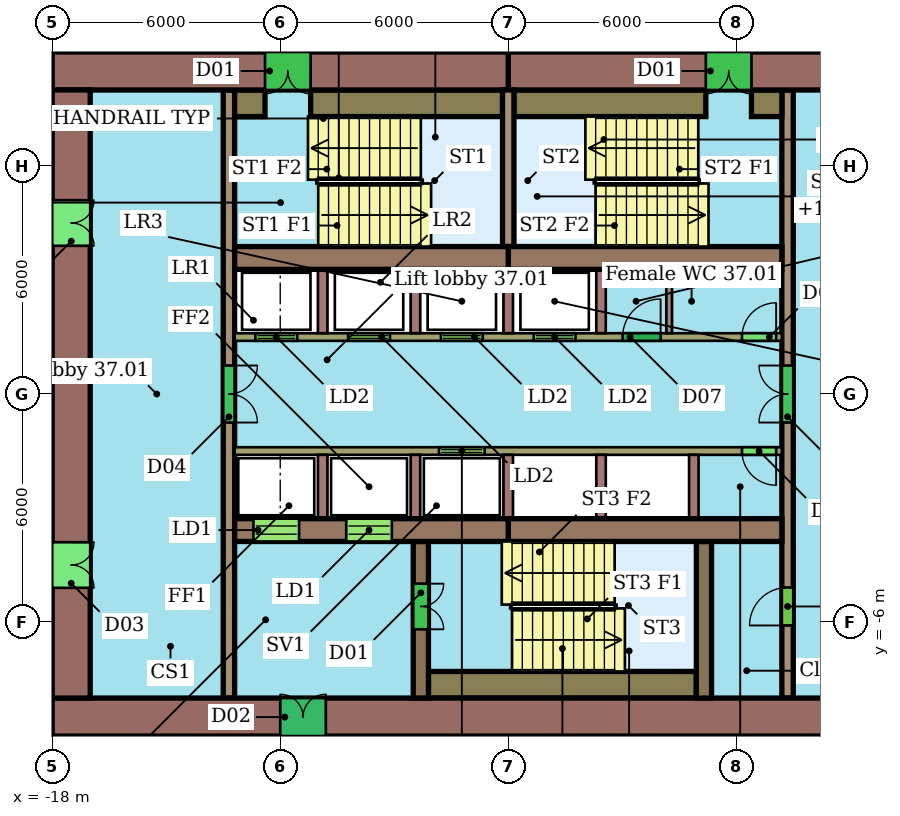
"""IFC4 building model, lengths in metres.
Left out: names, types, materials, properties, quantities, classifications, styles, units other than length and angle.
Written with IfcOpenShell. Run it as: python <this file> out.ifc"""

import sys

from ifc_helpers import new_model, si_unit, direction, frame, frame_2d, origin, place, context, subcontext, project, spatial, rectangle, extrude, element, fill, save


model = new_model("IFC4")
c1 = context("Model", 3, precision=1e-05, world=origin(), true_north=direction((0.0, 1.0)))
c2 = subcontext(c1, "Body", "Model", "MODEL_VIEW")
j1 = project(units=[si_unit("LENGTHUNIT", "METRE"), si_unit("PLANEANGLEUNIT", "RADIAN")], contexts=[c1])
p1 = place(None, origin())
s1 = spatial("IfcSite", under=j1, at=p1, CompositionType="ELEMENT")
p2 = place(p1, origin())
s2 = spatial("IfcBuilding", under=s1, at=p2, CompositionType="ELEMENT")
p3 = place(p2, frame((0.0, 0.0, 157.8)))
s3 = spatial("IfcBuildingStorey", under=s2, at=p3, CompositionType="ELEMENT", Elevation=157.8)
p4 = place(p3, frame((6.0, 8.5, 0.0), z_axis=(0.0, 0.0, 1.0), x_axis=(-1.0, 0.0, 0.0)))
e1 = element("IfcWall", 1, at=p4, inside=s3, PredefinedType="SHEAR", context=c2, shape_type="SweptSolid", body=[
    extrude(rectangle(XDim=12.0, YDim=1.0, at=frame_2d((6.0, 0.0))), origin(), (0.0, 0.0, 1.0), 3.3),
])
p5 = place(p4, frame((5.6, 0.0, 0.0)))
e2 = element("IfcOpeningElement", 2, at=p5, cuts=e1, PredefinedType="OPENING", context=c2, shape_type="SweptSolid", body=[
    extrude(rectangle(XDim=1.2, YDim=2.1, at=frame_2d((0.6, 1.05))), frame((0.0, 0.51, 0.0), z_axis=(0.0, -1.0, 0.0), x_axis=(1.0, 0.0, 0.0)), (0.0, 0.0, 1.0), 1.02),
])
p6 = place(p3, frame((-6.0, 8.5, 0.0), z_axis=(0.0, 0.0, 1.0), x_axis=(-1.0, 0.0, 0.0)))
e3 = element("IfcWall", 3, at=p6, inside=s3, PredefinedType="SHEAR", context=c2, shape_type="SweptSolid", body=[
    extrude(rectangle(XDim=12.0, YDim=1.0, at=frame_2d((6.0, 0.0))), origin(), (0.0, 0.0, 1.0), 3.3),
])
p7 = place(p6, frame((5.2, 0.0, 0.0)))
e4 = element("IfcOpeningElement", 4, at=p7, cuts=e3, PredefinedType="OPENING", context=c2, shape_type="SweptSolid", body=[
    extrude(rectangle(XDim=1.2, YDim=2.1, at=frame_2d((0.6, 1.05))), frame((0.0, 0.51, 0.0), z_axis=(0.0, -1.0, 0.0), x_axis=(1.0, 0.0, 0.0)), (0.0, 0.0, 1.0), 1.02),
])
p8 = place(p3, frame((-18.0, -8.5, 0.0), z_axis=(0.0, 0.0, 1.0), x_axis=(1.0, 0.0, 0.0)))
e5 = element("IfcWall", 5, at=p8, inside=s3, PredefinedType="SHEAR", context=c2, shape_type="SweptSolid", body=[
    extrude(rectangle(XDim=24.0, YDim=1.0, at=frame_2d((12.0, 0.0))), origin(), (0.0, 0.0, 1.0), 3.3),
])
p9 = place(p8, frame((6.0, 0.0, 0.0)))
e6 = element("IfcOpeningElement", 6, at=p9, cuts=e5, PredefinedType="OPENING", context=c2, shape_type="SweptSolid", body=[
    extrude(rectangle(XDim=1.2, YDim=2.1, at=frame_2d((0.6, 1.05))), frame((0.0, 0.51, 0.0), z_axis=(0.0, -1.0, 0.0), x_axis=(1.0, 0.0, 0.0)), (0.0, 0.0, 1.0), 1.02),
])
p10 = place(p3, frame((-17.5, 8.0, 0.0), z_axis=(0.0, 0.0, 1.0), x_axis=(0.0, -1.0, 0.0)))
e7 = element("IfcWall", 7, at=p10, inside=s3, PredefinedType="SHEAR", context=c2, shape_type="SweptSolid", body=[
    extrude(rectangle(XDim=16.0, YDim=1.0, at=frame_2d((8.0, 0.0))), origin(), (0.0, 0.0, 1.0), 3.3),
])
p11 = place(p10, frame((11.9, 0.0, 0.0)))
e8 = element("IfcOpeningElement", 8, at=p11, cuts=e7, PredefinedType="OPENING", context=c2, shape_type="SweptSolid", body=[
    extrude(rectangle(XDim=1.2, YDim=2.1, at=frame_2d((0.6, 1.05))), frame((0.0, 0.51, 0.0), z_axis=(0.0, -1.0, 0.0), x_axis=(1.0, 0.0, 0.0)), (0.0, 0.0, 1.0), 1.02),
])
p12 = place(p10, frame((2.9, 0.0, 0.0)))
e9 = element("IfcOpeningElement", 9, at=p12, cuts=e7, PredefinedType="OPENING", context=c2, shape_type="SweptSolid", body=[
    extrude(rectangle(XDim=1.2, YDim=2.1, at=frame_2d((0.6, 1.05))), frame((0.0, 0.51, 0.0), z_axis=(0.0, -1.0, 0.0), x_axis=(1.0, 0.0, 0.0)), (0.0, 0.0, 1.0), 1.02),
])
for number, where, z_axis, x_axis in (
    (10, (-13.2, 3.58, 0.0), (0.0, 0.0, 1.0), (1.0, 0.0, 0.0)),
    (11, (-6.0, 3.58, 0.0), (0.0, 0.0, 1.0), (1.0, 0.0, 0.0)),
):
    element("IfcWall", number, at=place(p3, frame(where, z_axis=z_axis, x_axis=x_axis)), inside=s3, PredefinedType="SHEAR", context=c2, shape_type="SweptSolid", body=[
        extrude(rectangle(XDim=7.2, YDim=0.6, at=frame_2d((3.6, 0.0))), origin(), (0.0, 0.0, 1.0), 3.3),
    ])
p13 = place(p3, frame((-13.2, -3.58, 0.0), z_axis=(0.0, 0.0, 1.0), x_axis=(1.0, 0.0, 0.0)))
e12 = element("IfcWall", 12, at=p13, inside=s3, PredefinedType="SHEAR", context=c2, shape_type="SweptSolid", body=[
    extrude(rectangle(XDim=7.2, YDim=0.6, at=frame_2d((3.6, 0.0))), origin(), (0.0, 0.0, 1.0), 3.3),
])
p14 = place(p13, frame((0.496, 0.0, 0.0)))
e13 = element("IfcOpeningElement", 13, at=p14, cuts=e12, PredefinedType="OPENING", context=c2, shape_type="SweptSolid", body=[
    extrude(rectangle(XDim=1.2, YDim=2.1, at=frame_2d((0.6, 1.05))), frame((0.0, 0.31, 0.0), z_axis=(0.0, -1.0, 0.0), x_axis=(1.0, 0.0, 0.0)), (0.0, 0.0, 1.0), 0.62),
])
p15 = place(p13, frame((2.938, 0.0, 0.0)))
e14 = element("IfcOpeningElement", 14, at=p15, cuts=e12, PredefinedType="OPENING", context=c2, shape_type="SweptSolid", body=[
    extrude(rectangle(XDim=1.2, YDim=2.1, at=frame_2d((0.6, 1.05))), frame((0.0, 0.31, 0.0), z_axis=(0.0, -1.0, 0.0), x_axis=(1.0, 0.0, 0.0)), (0.0, 0.0, 1.0), 0.62),
])
p16 = place(p3, frame((-6.0, -3.58, 0.0), z_axis=(0.0, 0.0, 1.0), x_axis=(1.0, 0.0, 0.0)))
e15 = element("IfcWall", 15, at=p16, inside=s3, PredefinedType="SHEAR", context=c2, shape_type="SweptSolid", body=[
    extrude(rectangle(XDim=7.2, YDim=0.6, at=frame_2d((3.6, 0.0))), origin(), (0.0, 0.0, 1.0), 3.3),
])
p17 = place(p3, frame((-13.35, 8.0, 0.0), z_axis=(0.0, 0.0, 1.0), x_axis=(0.0, -1.0, 0.0)))
e16 = element("IfcWall", 16, at=p17, inside=s3, PredefinedType="SHEAR", context=c2, shape_type="SweptSolid", body=[
    extrude(rectangle(XDim=16.0, YDim=0.3, at=frame_2d((8.0, 0.0))), origin(), (0.0, 0.0, 1.0), 3.3),
])
p18 = place(p17, frame((7.25, 0.0, 0.0)))
e17 = element("IfcOpeningElement", 17, at=p18, cuts=e16, PredefinedType="OPENING", context=c2, shape_type="SweptSolid", body=[
    extrude(rectangle(XDim=1.5, YDim=2.1, at=frame_2d((0.75, 1.05))), frame((0.0, 0.16, 0.0), z_axis=(0.0, -1.0, 0.0), x_axis=(1.0, 0.0, 0.0)), (0.0, 0.0, 1.0), 0.32),
])
p19 = place(p3, frame((1.35, -8.0, 0.0), z_axis=(0.0, 0.0, 1.0), x_axis=(0.0, 1.0, 0.0)))
e18 = element("IfcWall", 18, at=p19, inside=s3, PredefinedType="SHEAR", context=c2, shape_type="SweptSolid", body=[
    extrude(rectangle(XDim=16.0, YDim=0.3, at=frame_2d((8.0, 0.0))), origin(), (0.0, 0.0, 1.0), 3.3),
])
p20 = place(p19, frame((1.91, 0.0, 0.0)))
e19 = element("IfcOpeningElement", 19, at=p20, cuts=e18, PredefinedType="OPENING", context=c2, shape_type="SweptSolid", body=[
    extrude(rectangle(XDim=1.0, YDim=2.1, at=frame_2d((0.5, 1.05))), frame((0.0, 0.16, 0.0), z_axis=(0.0, -1.0, 0.0), x_axis=(1.0, 0.0, 0.0)), (0.0, 0.0, 1.0), 0.32),
])
p21 = place(p19, frame((7.25, 0.0, 0.0)))
e20 = element("IfcOpeningElement", 20, at=p21, cuts=e18, PredefinedType="OPENING", context=c2, shape_type="SweptSolid", body=[
    extrude(rectangle(XDim=1.5, YDim=2.1, at=frame_2d((0.75, 1.05))), frame((0.0, 0.16, 0.0), z_axis=(0.0, -1.0, 0.0), x_axis=(1.0, 0.0, 0.0)), (0.0, 0.0, 1.0), 0.32),
])
p22 = place(p3, frame((-13.2, 1.5, 0.0), z_axis=(0.0, 0.0, 1.0), x_axis=(1.0, 0.0, 0.0)))
e21 = element("IfcWall", 21, at=p22, inside=s3, PredefinedType="SHEAR", context=c2, shape_type="SweptSolid", body=[
    extrude(rectangle(XDim=14.4, YDim=0.2, at=frame_2d((7.2, 0.0))), origin(), (0.0, 0.0, 1.0), 3.3),
])
p23 = place(p22, frame((0.546, 0.0, 0.0)))
e22 = element("IfcOpeningElement", 22, at=p23, cuts=e21, PredefinedType="OPENING", context=c2, shape_type="SweptSolid", body=[
    extrude(rectangle(XDim=1.1, YDim=2.1, at=frame_2d((0.55, 1.05))), frame((0.0, 0.11, 0.0), z_axis=(0.0, -1.0, 0.0), x_axis=(1.0, 0.0, 0.0)), (0.0, 0.0, 1.0), 0.22),
])
p24 = place(p22, frame((2.988, 0.0, 0.0)))
e23 = element("IfcOpeningElement", 23, at=p24, cuts=e21, PredefinedType="OPENING", context=c2, shape_type="SweptSolid", body=[
    extrude(rectangle(XDim=1.1, YDim=2.1, at=frame_2d((0.55, 1.05))), frame((0.0, 0.11, 0.0), z_axis=(0.0, -1.0, 0.0), x_axis=(1.0, 0.0, 0.0)), (0.0, 0.0, 1.0), 0.22),
])
p25 = place(p22, frame((5.429, 0.0, 0.0)))
e24 = element("IfcOpeningElement", 24, at=p25, cuts=e21, PredefinedType="OPENING", context=c2, shape_type="SweptSolid", body=[
    extrude(rectangle(XDim=1.1, YDim=2.1, at=frame_2d((0.55, 1.05))), frame((0.0, 0.11, 0.0), z_axis=(0.0, -1.0, 0.0), x_axis=(1.0, 0.0, 0.0)), (0.0, 0.0, 1.0), 0.22),
])
p26 = place(p22, frame((7.871, 0.0, 0.0)))
e25 = element("IfcOpeningElement", 25, at=p26, cuts=e21, PredefinedType="OPENING", context=c2, shape_type="SweptSolid", body=[
    extrude(rectangle(XDim=1.1, YDim=2.1, at=frame_2d((0.55, 1.05))), frame((0.0, 0.11, 0.0), z_axis=(0.0, -1.0, 0.0), x_axis=(1.0, 0.0, 0.0)), (0.0, 0.0, 1.0), 0.22),
])
p27 = place(p22, frame((10.21, 0.0, 0.0)))
e26 = element("IfcOpeningElement", 26, at=p27, cuts=e21, PredefinedType="OPENING", context=c2, shape_type="SweptSolid", body=[
    extrude(rectangle(XDim=1.0, YDim=2.1, at=frame_2d((0.5, 1.05))), frame((0.0, 0.11, 0.0), z_axis=(0.0, -1.0, 0.0), x_axis=(1.0, 0.0, 0.0)), (0.0, 0.0, 1.0), 0.22),
])
p28 = place(p22, frame((13.35, 0.0, 0.0)))
e27 = element("IfcOpeningElement", 27, at=p28, cuts=e21, PredefinedType="OPENING", context=c2, shape_type="SweptSolid", body=[
    extrude(rectangle(XDim=0.9, YDim=2.1, at=frame_2d((0.45, 1.05))), frame((0.0, 0.11, 0.0), z_axis=(0.0, -1.0, 0.0), x_axis=(1.0, 0.0, 0.0)), (0.0, 0.0, 1.0), 0.22),
])
p29 = place(p3, frame((1.2, -1.5, 0.0), z_axis=(0.0, 0.0, 1.0), x_axis=(-1.0, 0.0, 0.0)))
e28 = element("IfcWall", 28, at=p29, inside=s3, PredefinedType="SHEAR", context=c2, shape_type="SweptSolid", body=[
    extrude(rectangle(XDim=14.4, YDim=0.2, at=frame_2d((7.2, 0.0))), origin(), (0.0, 0.0, 1.0), 3.3),
])
p30 = place(p29, frame((7.821, 0.0, 0.0)))
e29 = element("IfcOpeningElement", 29, at=p30, cuts=e28, PredefinedType="OPENING", context=c2, shape_type="SweptSolid", body=[
    extrude(rectangle(XDim=1.2, YDim=2.1, at=frame_2d((0.6, 1.05))), frame((0.0, 0.11, 0.0), z_axis=(0.0, -1.0, 0.0), x_axis=(1.0, 0.0, 0.0)), (0.0, 0.0, 1.0), 0.22),
])
p31 = place(p29, frame((0.15, 0.0, 0.0)))
e30 = element("IfcOpeningElement", 30, at=p31, cuts=e28, PredefinedType="OPENING", context=c2, shape_type="SweptSolid", body=[
    extrude(rectangle(XDim=0.9, YDim=2.1, at=frame_2d((0.45, 1.05))), frame((0.0, 0.11, 0.0), z_axis=(0.0, -1.0, 0.0), x_axis=(1.0, 0.0, 0.0)), (0.0, 0.0, 1.0), 0.22),
])
p32 = place(p3, frame((-8.3, -3.88, 0.0), z_axis=(0.0, 0.0, 1.0), x_axis=(0.0, -1.0, 0.0)))
e31 = element("IfcWall", 31, at=p32, inside=s3, PredefinedType="SHEAR", context=c2, shape_type="SweptSolid", body=[
    extrude(rectangle(XDim=4.12, YDim=0.4, at=frame_2d((2.06, 0.0))), origin(), (0.0, 0.0, 1.0), 3.3),
])
p33 = place(p32, frame((1.11, 0.0, 0.0)))
e32 = element("IfcOpeningElement", 32, at=p33, cuts=e31, PredefinedType="OPENING", context=c2, shape_type="SweptSolid", body=[
    extrude(rectangle(XDim=1.2, YDim=2.1, at=frame_2d((0.6, 1.05))), frame((0.0, 0.21, 0.0), z_axis=(0.0, -1.0, 0.0), x_axis=(1.0, 0.0, 0.0)), (0.0, 0.0, 1.0), 0.42),
])
p34 = place(p3, frame((-0.85, -3.88, 0.0), z_axis=(0.0, 0.0, 1.0), x_axis=(0.0, -1.0, 0.0)))
e33 = element("IfcWall", 33, at=p34, inside=s3, PredefinedType="SHEAR", context=c2, shape_type="SweptSolid", body=[
    extrude(rectangle(XDim=4.12, YDim=0.4, at=frame_2d((2.06, 0.0))), origin(), (0.0, 0.0, 1.0), 3.3),
])
p35 = place(p3, frame((-6.0, 3.88, 0.0), z_axis=(0.0, 0.0, 1.0), x_axis=(0.0, 1.0, 0.0)))
e34 = element("IfcWall", 34, at=p35, inside=s3, PredefinedType="SHEAR", context=c2, shape_type="SweptSolid", body=[
    extrude(rectangle(XDim=4.12, YDim=0.3, at=frame_2d((2.06, 0.0))), origin(), (0.0, 0.0, 1.0), 3.3),
])
p36 = place(p3, frame((-13.2, 7.65, 0.0), z_axis=(0.0, 0.0, 1.0), x_axis=(1.0, 0.0, 0.0)))
e35 = element("IfcWall", 35, at=p36, inside=s3, PredefinedType="SHEAR", context=c2, shape_type="SweptSolid", body=[
    extrude(rectangle(XDim=0.8, YDim=0.7, at=frame_2d((0.4, 0.0))), origin(), (0.0, 0.0, 1.0), 3.3),
])
for number, where, z_axis, x_axis in (
    (36, (-11.2, 7.65, 0.0), (0.0, 0.0, 1.0), (1.0, 0.0, 0.0)),
    (37, (-5.85, 7.65, 0.0), (0.0, 0.0, 1.0), (1.0, 0.0, 0.0)),
):
    element("IfcWall", number, at=place(p3, frame(where, z_axis=z_axis, x_axis=x_axis)), inside=s3, PredefinedType="SHEAR", context=c2, shape_type="SweptSolid", body=[
        extrude(rectangle(XDim=5.05, YDim=0.7, at=frame_2d((2.525, 0.0))), origin(), (0.0, 0.0, 1.0), 3.3),
    ])
p37 = place(p3, frame((0.4, 7.65, 0.0), z_axis=(0.0, 0.0, 1.0), x_axis=(1.0, 0.0, 0.0)))
e38 = element("IfcWall", 38, at=p37, inside=s3, PredefinedType="SHEAR", context=c2, shape_type="SweptSolid", body=[
    extrude(rectangle(XDim=0.8, YDim=0.7, at=frame_2d((0.4, 0.0))), origin(), (0.0, 0.0, 1.0), 3.3),
])
p38 = place(p3, frame((-8.1, -7.65, 0.0), z_axis=(0.0, 0.0, 1.0), x_axis=(1.0, 0.0, 0.0)))
e39 = element("IfcWall", 39, at=p38, inside=s3, PredefinedType="SHEAR", context=c2, shape_type="SweptSolid", body=[
    extrude(rectangle(XDim=7.05, YDim=0.7, at=frame_2d((3.525, 0.0))), origin(), (0.0, 0.0, 1.0), 3.3),
])
for number, where, z_axis, x_axis in (
    (40, (-10.883, 1.6, 0.0), (0.0, 0.0, 1.0), (0.0, 1.0, 0.0)),
    (41, (-8.442, 1.6, 0.0), (0.0, 0.0, 1.0), (0.0, 1.0, 0.0)),
    (42, (-6.0, 1.6, 0.0), (0.0, 0.0, 1.0), (0.0, 1.0, 0.0)),
    (43, (-3.558, 1.6, 0.0), (0.0, 0.0, 1.0), (0.0, 1.0, 0.0)),
):
    element("IfcWall", number, at=place(p3, frame(where, z_axis=z_axis, x_axis=x_axis)), inside=s3, PredefinedType="SHEAR", context=c2, shape_type="SweptSolid", body=[
        extrude(rectangle(XDim=1.68, YDim=0.25, at=frame_2d((0.84, 0.0))), origin(), (0.0, 0.0, 1.0), 3.3),
    ])
p39 = place(p3, frame((-1.765, 1.6, 0.0), z_axis=(0.0, 0.0, 1.0), x_axis=(0.0, 1.0, 0.0)))
e44 = element("IfcWall", 44, at=p39, inside=s3, PredefinedType="PARTITIONING", context=c2, shape_type="SweptSolid", body=[
    extrude(rectangle(XDim=1.68, YDim=0.15, at=frame_2d((0.84, 0.0))), origin(), (0.0, 0.0, 1.0), 3.3),
])
for number, where, z_axis, x_axis in (
    (45, (-10.883, -1.6, 0.0), (0.0, 0.0, 1.0), (0.0, -1.0, 0.0)),
    (46, (-8.442, -1.6, 0.0), (0.0, 0.0, 1.0), (0.0, -1.0, 0.0)),
    (47, (-6.0, -1.6, 0.0), (0.0, 0.0, 1.0), (0.0, -1.0, 0.0)),
    (48, (-3.558, -1.6, 0.0), (0.0, 0.0, 1.0), (0.0, -1.0, 0.0)),
    (49, (-1.117, -1.6, 0.0), (0.0, 0.0, 1.0), (0.0, -1.0, 0.0)),
):
    element("IfcWall", number, at=place(p3, frame(where, z_axis=z_axis, x_axis=x_axis)), inside=s3, PredefinedType="SHEAR", context=c2, shape_type="SweptSolid", body=[
        extrude(rectangle(XDim=1.68, YDim=0.25, at=frame_2d((0.84, 0.0))), origin(), (0.0, 0.0, 1.0), 3.3),
    ])
p40 = place(p5, origin())
e50 = element("IfcDoor", 50, at=p40, inside=s3, OperationType="DOUBLE_DOOR_SINGLE_SWING", PredefinedType="NOTDEFINED", context=c2, shape_type="SweptSolid", body=[
    extrude(rectangle(XDim=1.2, YDim=2.1, at=frame_2d((0.6, 1.05))), frame((0.0, 0.025, 0.0), z_axis=(0.0, -1.0, 0.0), x_axis=(1.0, 0.0, 0.0)), (0.0, 0.0, 1.0), 0.05),
])
fill(e2, e50)
p41 = place(p7, origin())
e51 = element("IfcDoor", 51, at=p41, inside=s3, OperationType="DOUBLE_DOOR_SINGLE_SWING", PredefinedType="NOTDEFINED", context=c2, shape_type="SweptSolid", body=[
    extrude(rectangle(XDim=1.2, YDim=2.1, at=frame_2d((0.6, 1.05))), frame((0.0, 0.025, 0.0), z_axis=(0.0, -1.0, 0.0), x_axis=(1.0, 0.0, 0.0)), (0.0, 0.0, 1.0), 0.05),
])
fill(e4, e51)
p42 = place(p9, origin())
e52 = element("IfcDoor", 52, at=p42, inside=s3, OperationType="DOUBLE_DOOR_SINGLE_SWING", PredefinedType="NOTDEFINED", context=c2, shape_type="SweptSolid", body=[
    extrude(rectangle(XDim=1.2, YDim=2.1, at=frame_2d((0.6, 1.05))), frame((0.0, 0.025, 0.0), z_axis=(0.0, -1.0, 0.0), x_axis=(1.0, 0.0, 0.0)), (0.0, 0.0, 1.0), 0.05),
])
fill(e6, e52)
p43 = place(p11, origin())
e53 = element("IfcDoor", 53, at=p43, inside=s3, OperationType="DOUBLE_DOOR_SINGLE_SWING", PredefinedType="NOTDEFINED", context=c2, shape_type="SweptSolid", body=[
    extrude(rectangle(XDim=1.2, YDim=2.1, at=frame_2d((0.6, 1.05))), frame((0.0, 0.025, 0.0), z_axis=(0.0, -1.0, 0.0), x_axis=(1.0, 0.0, 0.0)), (0.0, 0.0, 1.0), 0.05),
])
fill(e8, e53)
p44 = place(p12, origin())
e54 = element("IfcDoor", 54, at=p44, inside=s3, OperationType="DOUBLE_DOOR_SINGLE_SWING", PredefinedType="NOTDEFINED", context=c2, shape_type="SweptSolid", body=[
    extrude(rectangle(XDim=1.2, YDim=2.1, at=frame_2d((0.6, 1.05))), frame((0.0, 0.025, 0.0), z_axis=(0.0, -1.0, 0.0), x_axis=(1.0, 0.0, 0.0)), (0.0, 0.0, 1.0), 0.05),
])
fill(e9, e54)
p45 = place(p14, origin())
e55 = element("IfcDoor", 55, at=p45, inside=s3, OperationType="DOUBLE_DOOR_SLIDING", PredefinedType="NOTDEFINED", context=c2, shape_type="SweptSolid", body=[
    extrude(rectangle(XDim=1.2, YDim=2.1, at=frame_2d((0.6, 1.05))), frame((0.0, 0.025, 0.0), z_axis=(0.0, -1.0, 0.0), x_axis=(1.0, 0.0, 0.0)), (0.0, 0.0, 1.0), 0.05),
])
fill(e13, e55)
p46 = place(p15, origin())
e56 = element("IfcDoor", 56, at=p46, inside=s3, OperationType="DOUBLE_DOOR_SLIDING", PredefinedType="NOTDEFINED", context=c2, shape_type="SweptSolid", body=[
    extrude(rectangle(XDim=1.2, YDim=2.1, at=frame_2d((0.6, 1.05))), frame((0.0, 0.025, 0.0), z_axis=(0.0, -1.0, 0.0), x_axis=(1.0, 0.0, 0.0)), (0.0, 0.0, 1.0), 0.05),
])
fill(e14, e56)
p47 = place(p18, origin())
e57 = element("IfcDoor", 57, at=p47, inside=s3, OperationType="DOUBLE_DOOR_SINGLE_SWING", PredefinedType="NOTDEFINED", context=c2, shape_type="SweptSolid", body=[
    extrude(rectangle(XDim=1.5, YDim=2.1, at=frame_2d((0.75, 1.05))), frame((0.0, 0.025, 0.0), z_axis=(0.0, -1.0, 0.0), x_axis=(1.0, 0.0, 0.0)), (0.0, 0.0, 1.0), 0.05),
])
fill(e17, e57)
p48 = place(p20, origin())
e58 = element("IfcDoor", 58, at=p48, inside=s3, OperationType="SINGLE_SWING_LEFT", PredefinedType="NOTDEFINED", context=c2, shape_type="SweptSolid", body=[
    extrude(rectangle(XDim=1.0, YDim=2.1, at=frame_2d((0.5, 1.05))), frame((0.0, 0.025, 0.0), z_axis=(0.0, -1.0, 0.0), x_axis=(1.0, 0.0, 0.0)), (0.0, 0.0, 1.0), 0.05),
])
fill(e19, e58)
p49 = place(p21, origin())
e59 = element("IfcDoor", 59, at=p49, inside=s3, OperationType="DOUBLE_DOOR_SINGLE_SWING", PredefinedType="NOTDEFINED", context=c2, shape_type="SweptSolid", body=[
    extrude(rectangle(XDim=1.5, YDim=2.1, at=frame_2d((0.75, 1.05))), frame((0.0, 0.025, 0.0), z_axis=(0.0, -1.0, 0.0), x_axis=(1.0, 0.0, 0.0)), (0.0, 0.0, 1.0), 0.05),
])
fill(e20, e59)
p50 = place(p23, origin())
e60 = element("IfcDoor", 60, at=p50, inside=s3, OperationType="DOUBLE_DOOR_SLIDING", PredefinedType="NOTDEFINED", context=c2, shape_type="SweptSolid", body=[
    extrude(rectangle(XDim=1.1, YDim=2.1, at=frame_2d((0.55, 1.05))), frame((0.0, 0.025, 0.0), z_axis=(0.0, -1.0, 0.0), x_axis=(1.0, 0.0, 0.0)), (0.0, 0.0, 1.0), 0.05),
])
fill(e22, e60)
p51 = place(p24, origin())
e61 = element("IfcDoor", 61, at=p51, inside=s3, OperationType="DOUBLE_DOOR_SLIDING", PredefinedType="NOTDEFINED", context=c2, shape_type="SweptSolid", body=[
    extrude(rectangle(XDim=1.1, YDim=2.1, at=frame_2d((0.55, 1.05))), frame((0.0, 0.025, 0.0), z_axis=(0.0, -1.0, 0.0), x_axis=(1.0, 0.0, 0.0)), (0.0, 0.0, 1.0), 0.05),
])
fill(e23, e61)
p52 = place(p25, origin())
e62 = element("IfcDoor", 62, at=p52, inside=s3, OperationType="DOUBLE_DOOR_SLIDING", PredefinedType="NOTDEFINED", context=c2, shape_type="SweptSolid", body=[
    extrude(rectangle(XDim=1.1, YDim=2.1, at=frame_2d((0.55, 1.05))), frame((0.0, 0.025, 0.0), z_axis=(0.0, -1.0, 0.0), x_axis=(1.0, 0.0, 0.0)), (0.0, 0.0, 1.0), 0.05),
])
fill(e24, e62)
p53 = place(p26, origin())
e63 = element("IfcDoor", 63, at=p53, inside=s3, OperationType="DOUBLE_DOOR_SLIDING", PredefinedType="NOTDEFINED", context=c2, shape_type="SweptSolid", body=[
    extrude(rectangle(XDim=1.1, YDim=2.1, at=frame_2d((0.55, 1.05))), frame((0.0, 0.025, 0.0), z_axis=(0.0, -1.0, 0.0), x_axis=(1.0, 0.0, 0.0)), (0.0, 0.0, 1.0), 0.05),
])
fill(e25, e63)
p54 = place(p27, origin())
e64 = element("IfcDoor", 64, at=p54, inside=s3, OperationType="SINGLE_SWING_RIGHT", PredefinedType="NOTDEFINED", context=c2, shape_type="SweptSolid", body=[
    extrude(rectangle(XDim=1.0, YDim=2.1, at=frame_2d((0.5, 1.05))), frame((0.0, 0.025, 0.0), z_axis=(0.0, -1.0, 0.0), x_axis=(1.0, 0.0, 0.0)), (0.0, 0.0, 1.0), 0.05),
])
fill(e26, e64)
p55 = place(p28, origin())
e65 = element("IfcDoor", 65, at=p55, inside=s3, OperationType="SINGLE_SWING_RIGHT", PredefinedType="NOTDEFINED", context=c2, shape_type="SweptSolid", body=[
    extrude(rectangle(XDim=0.9, YDim=2.1, at=frame_2d((0.45, 1.05))), frame((0.0, 0.025, 0.0), z_axis=(0.0, -1.0, 0.0), x_axis=(1.0, 0.0, 0.0)), (0.0, 0.0, 1.0), 0.05),
])
fill(e27, e65)
p56 = place(p30, origin())
e66 = element("IfcDoor", 66, at=p56, inside=s3, OperationType="DOUBLE_DOOR_SLIDING", PredefinedType="NOTDEFINED", context=c2, shape_type="SweptSolid", body=[
    extrude(rectangle(XDim=1.2, YDim=2.1, at=frame_2d((0.6, 1.05))), frame((0.0, 0.025, 0.0), z_axis=(0.0, -1.0, 0.0), x_axis=(1.0, 0.0, 0.0)), (0.0, 0.0, 1.0), 0.05),
])
fill(e29, e66)
p57 = place(p31, origin())
e67 = element("IfcDoor", 67, at=p57, inside=s3, OperationType="SINGLE_SWING_LEFT", PredefinedType="NOTDEFINED", context=c2, shape_type="SweptSolid", body=[
    extrude(rectangle(XDim=0.9, YDim=2.1, at=frame_2d((0.45, 1.05))), frame((0.0, 0.025, 0.0), z_axis=(0.0, -1.0, 0.0), x_axis=(1.0, 0.0, 0.0)), (0.0, 0.0, 1.0), 0.05),
])
fill(e30, e67)
p58 = place(p33, origin())
e68 = element("IfcDoor", 68, at=p58, inside=s3, OperationType="DOUBLE_DOOR_SINGLE_SWING", PredefinedType="NOTDEFINED", context=c2, shape_type="SweptSolid", body=[
    extrude(rectangle(XDim=1.2, YDim=2.1, at=frame_2d((0.6, 1.05))), frame((0.0, 0.025, 0.0), z_axis=(0.0, -1.0, 0.0), x_axis=(1.0, 0.0, 0.0)), (0.0, 0.0, 1.0), 0.05),
])
fill(e32, e68)
save(model, sys.argv[1])
